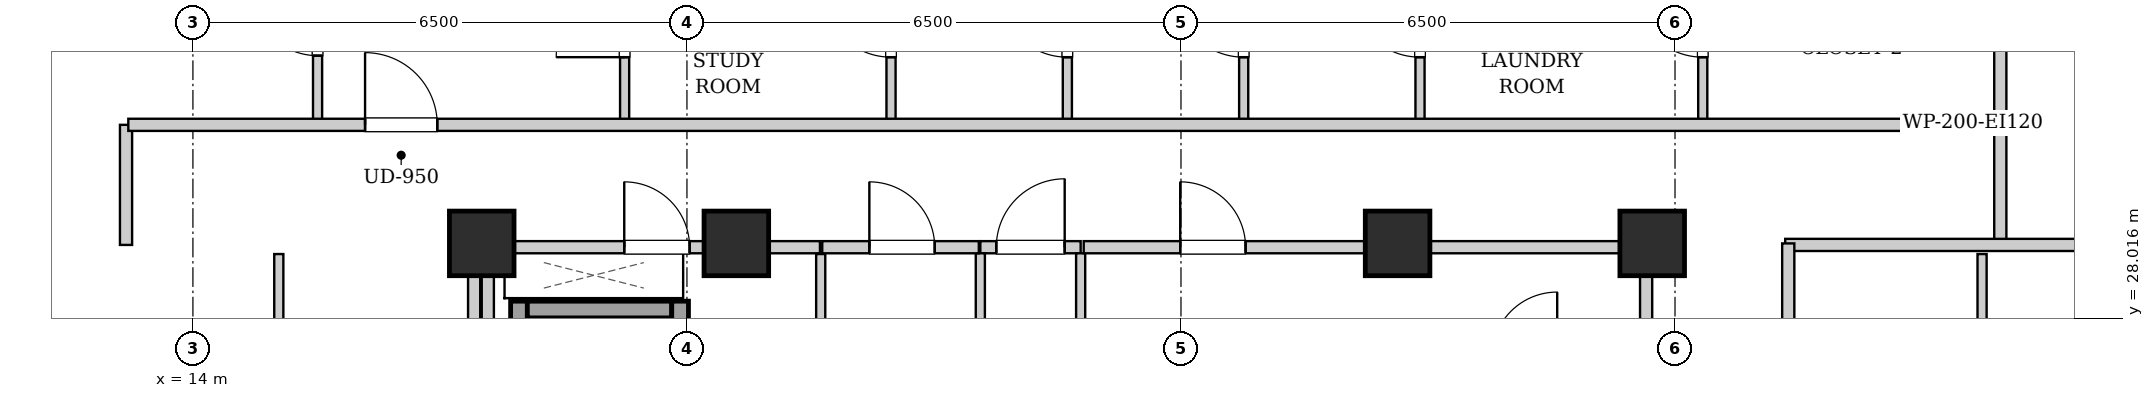
"""IFC4 building model, lengths in metres.
Left out: names, types, materials, properties, quantities, classifications, styles, units other than length and angle.
Written with IfcOpenShell. Run it as: python <this file> out.ifc"""

import sys

from ifc_helpers import new_model, si_unit, direction, frame, frame_2d, origin, origin_2d, place, context, subcontext, project, spatial, rectangle, extrude, element, fill, save


model = new_model("IFC4")
c1 = context("Model", 3, precision=1e-05, world=origin(), true_north=direction((0.0, 1.0)))
c2 = subcontext(c1, "Body", "Model", "MODEL_VIEW")
j1 = project(units=[si_unit("LENGTHUNIT", "METRE"), si_unit("PLANEANGLEUNIT", "RADIAN")], contexts=[c1])
p1 = place(None, origin())
s1 = spatial("IfcSite", under=j1, at=p1, CompositionType="ELEMENT")
p2 = place(p1, origin())
s2 = spatial("IfcBuilding", under=s1, at=p2, CompositionType="ELEMENT")
p3 = place(p2, frame((0.0, 0.0, 197.5)))
s3 = spatial("IfcBuildingStorey", under=s2, at=p3, CompositionType="ELEMENT", Elevation=197.5)
for number, where, z_axis, x_axis in (
    (1, (17.8, 29.0, 0.0), (0.0, 0.0, 1.0), (1.0, 0.0, 0.0)),
    (2, (21.15, 29.0, 0.0), (0.0, 0.0, 1.0), (1.0, 0.0, 0.0)),
    (3, (29.85, 29.0, 0.0), (0.0, 0.0, 1.0), (1.0, 0.0, 0.0)),
    (4, (33.2, 29.0, 0.0), (0.0, 0.0, 1.0), (1.0, 0.0, 0.0)),
):
    element("IfcColumn", number, at=place(p3, frame(where, z_axis=z_axis, x_axis=x_axis)), inside=s3, PredefinedType="COLUMN", context=c2, shape_type="SweptSolid", body=[
        extrude(rectangle(XDim=0.85, YDim=0.85, at=origin_2d()), origin(), (0.0, 0.0, 1.0), 3.3),
    ])
p4 = place(p3, frame((18.29, 24.1, 0.0), z_axis=(0.0, 0.0, 1.0), x_axis=(0.0, 1.0, 0.0)))
e5 = element("IfcWall", 5, at=p4, inside=s3, PredefinedType="SHEAR", context=c2, shape_type="SweptSolid", body=[
    extrude(rectangle(XDim=4.14, YDim=0.22, at=frame_2d((2.07, 0.0))), origin(), (0.0, 0.0, 1.0), 3.04),
])
p5 = place(p3, frame((18.4, 28.13, 0.0), z_axis=(0.0, 0.0, 1.0), x_axis=(1.0, 0.0, 0.0)))
e6 = element("IfcWall", 6, at=p5, inside=s3, PredefinedType="SHEAR", context=c2, shape_type="SweptSolid", body=[
    extrude(rectangle(XDim=1.9, YDim=0.22, at=frame_2d((0.95, 0.0))), origin(), (0.0, 0.0, 1.0), 3.04),
])
p6 = place(p3, frame((20.41, 26.06, 0.0), z_axis=(0.0, 0.0, 1.0), x_axis=(0.0, 1.0, 0.0)))
e7 = element("IfcWall", 7, at=p6, inside=s3, PredefinedType="SHEAR", context=c2, shape_type="SweptSolid", body=[
    extrude(rectangle(XDim=2.18, YDim=0.22, at=frame_2d((1.09, 0.0))), origin(), (0.0, 0.0, 1.0), 3.04),
])
p7 = place(p6, frame((0.54, 0.0, 0.0)))
e8 = element("IfcOpeningElement", 8, at=p7, cuts=e7, PredefinedType="OPENING", context=c2, shape_type="SweptSolid", body=[
    extrude(rectangle(XDim=1.1, YDim=2.15, at=frame_2d((0.55, 1.075))), frame((0.0, 0.12, 0.0), z_axis=(0.0, -1.0, 0.0), x_axis=(1.0, 0.0, 0.0)), (0.0, 0.0, 1.0), 0.24),
])
for number, where, z_axis, x_axis in (
    (9, (17.88, 24.12, 0.0), (0.0, 0.0, 1.0), (0.0, 1.0, 0.0)),
    (10, (33.12, 24.12, 0.0), (0.0, 0.0, 1.0), (0.0, 1.0, 0.0)),
):
    element("IfcWall", number, at=place(p3, frame(where, z_axis=z_axis, x_axis=x_axis)), inside=s3, PredefinedType="PARTITIONING", context=c2, shape_type="SweptSolid", body=[
        extrude(rectangle(XDim=4.76, YDim=0.16, at=frame_2d((2.38, 0.0))), origin(), (0.0, 0.0, 1.0), 2.375),
    ])
p8 = place(p3, frame((24.36, 28.95, 0.0), z_axis=(0.0, 0.0, 1.0), x_axis=(1.0, 0.0, 0.0)))
e11 = element("IfcWall", 11, at=p8, inside=s3, PredefinedType="PARTITIONING", context=c2, shape_type="SweptSolid", body=[
    extrude(rectangle(XDim=1.32, YDim=0.16, at=frame_2d((0.66, 0.0))), origin(), (0.0, 0.0, 1.0), 2.556),
])
p9 = place(p8, frame((0.21, 0.0, 0.0)))
e12 = element("IfcOpeningElement", 12, at=p9, cuts=e11, PredefinedType="OPENING", context=c2, shape_type="SweptSolid", body=[
    extrude(rectangle(XDim=0.9, YDim=2.05, at=frame_2d((0.45, 1.025))), frame((0.0, 0.09, 0.0), z_axis=(0.0, -1.0, 0.0), x_axis=(1.0, 0.0, 0.0)), (0.0, 0.0, 1.0), 0.18),
])
p10 = place(p3, frame((17.96, 28.95, 0.0), z_axis=(0.0, 0.0, 1.0), x_axis=(1.0, 0.0, 0.0)))
e13 = element("IfcWall", 13, at=p10, inside=s3, PredefinedType="PARTITIONING", context=c2, shape_type="SweptSolid", body=[
    extrude(rectangle(XDim=4.29, YDim=0.16, at=frame_2d((2.145, 0.0))), origin(), (0.0, 0.0, 1.0), 2.556),
])
p11 = place(p10, frame((1.715, 0.0, 0.0)))
e14 = element("IfcOpeningElement", 14, at=p11, cuts=e13, PredefinedType="OPENING", context=c2, shape_type="SweptSolid", body=[
    extrude(rectangle(XDim=0.86, YDim=2.05, at=frame_2d((0.43, 1.025))), frame((0.0, 0.09, 0.0), z_axis=(0.0, -1.0, 0.0), x_axis=(1.0, 0.0, 0.0)), (0.0, 0.0, 1.0), 0.18),
])
for number, where, z_axis, x_axis in (
    (15, (24.36, 25.0, 0.0), (0.0, 0.0, 1.0), (0.0, 1.0, 0.0)),
    (16, (25.68, 25.0, 0.0), (0.0, 0.0, 1.0), (0.0, 1.0, 0.0)),
):
    element("IfcWall", number, at=place(p3, frame(where, z_axis=z_axis, x_axis=x_axis)), inside=s3, PredefinedType="PARTITIONING", context=c2, shape_type="SweptSolid", body=[
        extrude(rectangle(XDim=3.87, YDim=0.12, at=frame_2d((1.935, 0.0))), origin(), (0.0, 0.0, 1.0), 3.04),
    ])
p12 = place(p3, frame((22.26, 25.0, 0.0), z_axis=(0.0, 0.0, 1.0), x_axis=(0.0, 1.0, 0.0)))
e17 = element("IfcWall", 17, at=p12, inside=s3, PredefinedType="PARTITIONING", context=c2, shape_type="SweptSolid", body=[
    extrude(rectangle(XDim=3.86, YDim=0.12, at=frame_2d((1.93, 0.0))), origin(), (0.0, 0.0, 1.0), 3.04),
])
p13 = place(p3, frame((22.28, 28.95, 0.0), z_axis=(0.0, 0.0, 1.0), x_axis=(1.0, 0.0, 0.0)))
e18 = element("IfcWall", 18, at=p13, inside=s3, PredefinedType="PARTITIONING", context=c2, shape_type="SweptSolid", body=[
    extrude(rectangle(XDim=2.06, YDim=0.16, at=frame_2d((1.03, 0.0))), origin(), (0.0, 0.0, 1.0), 2.556),
])
p14 = place(p13, frame((0.62, 0.0, 0.0)))
e19 = element("IfcOpeningElement", 19, at=p14, cuts=e18, PredefinedType="OPENING", context=c2, shape_type="SweptSolid", body=[
    extrude(rectangle(XDim=0.86, YDim=2.05, at=frame_2d((0.43, 1.025))), frame((0.0, 0.09, 0.0), z_axis=(0.0, -1.0, 0.0), x_axis=(1.0, 0.0, 0.0)), (0.0, 0.0, 1.0), 0.18),
])
p15 = place(p3, frame((25.72, 28.95, 0.0), z_axis=(0.0, 0.0, 1.0), x_axis=(1.0, 0.0, 0.0)))
e20 = element("IfcWall", 20, at=p15, inside=s3, PredefinedType="PARTITIONING", context=c2, shape_type="SweptSolid", body=[
    extrude(rectangle(XDim=7.32, YDim=0.16, at=frame_2d((3.66, 0.0))), origin(), (0.0, 0.0, 1.0), 2.556),
])
p16 = place(p15, frame((1.27, 0.0, 0.0)))
e21 = element("IfcOpeningElement", 21, at=p16, cuts=e20, PredefinedType="OPENING", context=c2, shape_type="SweptSolid", body=[
    extrude(rectangle(XDim=0.86, YDim=2.05, at=frame_2d((0.43, 1.025))), frame((0.0, 0.09, 0.0), z_axis=(0.0, -1.0, 0.0), x_axis=(1.0, 0.0, 0.0)), (0.0, 0.0, 1.0), 0.18),
])
for number, where, z_axis, x_axis in (
    (22, (13.12, 28.98, 0.0), (0.0, 0.0, 1.0), (0.0, 1.0, 0.0)),
    (23, (37.78, 28.98, 0.0), (0.0, 0.0, 1.0), (0.0, 1.0, 0.0)),
):
    element("IfcWall", number, at=place(p3, frame(where, z_axis=z_axis, x_axis=x_axis)), inside=s3, PredefinedType="PARTITIONING", context=c2, shape_type="SweptSolid", body=[
        extrude(rectangle(XDim=1.58, YDim=0.16, at=frame_2d((0.79, 0.0))), origin(), (0.0, 0.0, 1.0), 3.04),
    ])
p17 = place(p3, frame((34.95, 28.98, 0.0), z_axis=(0.0, 0.0, 1.0), x_axis=(1.0, 0.0, 0.0)))
e24 = element("IfcWall", 24, at=p17, inside=s3, PredefinedType="PARTITIONING", context=c2, shape_type="SweptSolid", body=[
    extrude(rectangle(XDim=5.07, YDim=0.16, at=frame_2d((2.535, 0.0))), origin(), (0.0, 0.0, 1.0), 2.556),
])
p18 = place(p3, frame((37.78, 30.6, 0.0), z_axis=(0.0, 0.0, 1.0), x_axis=(0.0, 1.0, 0.0)))
e25 = element("IfcWall", 25, at=p18, inside=s3, PredefinedType="PARTITIONING", context=c2, shape_type="SweptSolid", body=[
    extrude(rectangle(XDim=2.66, YDim=0.16, at=frame_2d((1.33, 0.0))), origin(), (0.0, 0.0, 1.0), 3.04),
])
p19 = place(p3, frame((15.64, 30.6, 0.0), z_axis=(0.0, 0.0, 1.0), x_axis=(0.0, 1.0, 0.0)))
e26 = element("IfcWall", 26, at=p19, inside=s3, PredefinedType="PARTITIONING", context=c2, shape_type="SweptSolid", body=[
    extrude(rectangle(XDim=2.6, YDim=0.12, at=frame_2d((1.3, 0.0))), origin(), (0.0, 0.0, 1.0), 3.04),
])
p20 = place(p19, frame((0.87, 0.0, 0.0)))
e27 = element("IfcOpeningElement", 27, at=p20, cuts=e26, PredefinedType="OPENING", context=c2, shape_type="SweptSolid", body=[
    extrude(rectangle(XDim=0.86, YDim=2.05, at=frame_2d((0.43, 1.025))), frame((0.0, 0.07, 0.0), z_axis=(0.0, -1.0, 0.0), x_axis=(1.0, 0.0, 0.0)), (0.0, 0.0, 1.0), 0.14),
])
p21 = place(p3, frame((19.68, 30.6, 0.0), z_axis=(0.0, 0.0, 1.0), x_axis=(0.0, 1.0, 0.0)))
e28 = element("IfcWall", 28, at=p21, inside=s3, PredefinedType="PARTITIONING", context=c2, shape_type="SweptSolid", body=[
    extrude(rectangle(XDim=2.6, YDim=0.12, at=frame_2d((1.3, 0.0))), origin(), (0.0, 0.0, 1.0), 3.04),
])
p22 = place(p21, frame((0.85, 0.0, 0.0)))
e29 = element("IfcOpeningElement", 29, at=p22, cuts=e28, PredefinedType="OPENING", context=c2, shape_type="SweptSolid", body=[
    extrude(rectangle(XDim=0.9, YDim=2.05, at=frame_2d((0.45, 1.025))), frame((0.0, 0.07, 0.0), z_axis=(0.0, -1.0, 0.0), x_axis=(1.0, 0.0, 0.0)), (0.0, 0.0, 1.0), 0.14),
])
p23 = place(p3, frame((23.185, 30.6, 0.0), z_axis=(0.0, 0.0, 1.0), x_axis=(0.0, 1.0, 0.0)))
e30 = element("IfcWall", 30, at=p23, inside=s3, PredefinedType="PARTITIONING", context=c2, shape_type="SweptSolid", body=[
    extrude(rectangle(XDim=2.6, YDim=0.12, at=frame_2d((1.3, 0.0))), origin(), (0.0, 0.0, 1.0), 3.04),
])
p24 = place(p23, frame((0.85, 0.0, 0.0)))
e31 = element("IfcOpeningElement", 31, at=p24, cuts=e30, PredefinedType="OPENING", context=c2, shape_type="SweptSolid", body=[
    extrude(rectangle(XDim=0.9, YDim=2.05, at=frame_2d((0.45, 1.025))), frame((0.0, 0.07, 0.0), z_axis=(0.0, -1.0, 0.0), x_axis=(1.0, 0.0, 0.0)), (0.0, 0.0, 1.0), 0.14),
])
p25 = place(p3, frame((25.505, 30.6, 0.0), z_axis=(0.0, 0.0, 1.0), x_axis=(0.0, 1.0, 0.0)))
e32 = element("IfcWall", 32, at=p25, inside=s3, PredefinedType="PARTITIONING", context=c2, shape_type="SweptSolid", body=[
    extrude(rectangle(XDim=2.6, YDim=0.12, at=frame_2d((1.3, 0.0))), origin(), (0.0, 0.0, 1.0), 3.04),
])
p26 = place(p25, frame((0.85, 0.0, 0.0)))
e33 = element("IfcOpeningElement", 33, at=p26, cuts=e32, PredefinedType="OPENING", context=c2, shape_type="SweptSolid", body=[
    extrude(rectangle(XDim=0.9, YDim=2.05, at=frame_2d((0.45, 1.025))), frame((0.0, 0.07, 0.0), z_axis=(0.0, -1.0, 0.0), x_axis=(1.0, 0.0, 0.0)), (0.0, 0.0, 1.0), 0.14),
])
p27 = place(p3, frame((27.825, 30.6, 0.0), z_axis=(0.0, 0.0, 1.0), x_axis=(0.0, 1.0, 0.0)))
e34 = element("IfcWall", 34, at=p27, inside=s3, PredefinedType="PARTITIONING", context=c2, shape_type="SweptSolid", body=[
    extrude(rectangle(XDim=2.6, YDim=0.12, at=frame_2d((1.3, 0.0))), origin(), (0.0, 0.0, 1.0), 3.04),
])
p28 = place(p27, frame((0.85, 0.0, 0.0)))
e35 = element("IfcOpeningElement", 35, at=p28, cuts=e34, PredefinedType="OPENING", context=c2, shape_type="SweptSolid", body=[
    extrude(rectangle(XDim=0.9, YDim=2.05, at=frame_2d((0.45, 1.025))), frame((0.0, 0.07, 0.0), z_axis=(0.0, -1.0, 0.0), x_axis=(1.0, 0.0, 0.0)), (0.0, 0.0, 1.0), 0.14),
])
p29 = place(p3, frame((30.145, 30.6, 0.0), z_axis=(0.0, 0.0, 1.0), x_axis=(0.0, 1.0, 0.0)))
e36 = element("IfcWall", 36, at=p29, inside=s3, PredefinedType="PARTITIONING", context=c2, shape_type="SweptSolid", body=[
    extrude(rectangle(XDim=2.6, YDim=0.12, at=frame_2d((1.3, 0.0))), origin(), (0.0, 0.0, 1.0), 3.04),
])
p30 = place(p29, frame((0.85, 0.0, 0.0)))
e37 = element("IfcOpeningElement", 37, at=p30, cuts=e36, PredefinedType="OPENING", context=c2, shape_type="SweptSolid", body=[
    extrude(rectangle(XDim=0.9, YDim=2.05, at=frame_2d((0.45, 1.025))), frame((0.0, 0.07, 0.0), z_axis=(0.0, -1.0, 0.0), x_axis=(1.0, 0.0, 0.0)), (0.0, 0.0, 1.0), 0.14),
])
p31 = place(p3, frame((33.865, 30.6, 0.0), z_axis=(0.0, 0.0, 1.0), x_axis=(0.0, 1.0, 0.0)))
e38 = element("IfcWall", 38, at=p31, inside=s3, PredefinedType="PARTITIONING", context=c2, shape_type="SweptSolid", body=[
    extrude(rectangle(XDim=2.6, YDim=0.12, at=frame_2d((1.3, 0.0))), origin(), (0.0, 0.0, 1.0), 3.04),
])
p32 = place(p31, frame((0.85, 0.0, 0.0)))
e39 = element("IfcOpeningElement", 39, at=p32, cuts=e38, PredefinedType="OPENING", context=c2, shape_type="SweptSolid", body=[
    extrude(rectangle(XDim=0.9, YDim=2.05, at=frame_2d((0.45, 1.025))), frame((0.0, 0.07, 0.0), z_axis=(0.0, -1.0, 0.0), x_axis=(1.0, 0.0, 0.0)), (0.0, 0.0, 1.0), 0.14),
])
p33 = place(p3, frame((15.13, 24.552, 0.0), z_axis=(0.0, 0.0, 1.0), x_axis=(0.0, 1.0, 0.0)))
e40 = element("IfcWall", 40, at=p33, inside=s3, PredefinedType="PARTITIONING", context=c2, shape_type="SweptSolid", body=[
    extrude(rectangle(XDim=4.308, YDim=0.12, at=frame_2d((2.154, 0.0))), origin(), (0.0, 0.0, 1.0), 3.04),
])
p34 = place(p33, frame((1.704, 0.0, 0.0)))
e41 = element("IfcOpeningElement", 41, at=p34, cuts=e40, PredefinedType="OPENING", context=c2, shape_type="SweptSolid", body=[
    extrude(rectangle(XDim=0.9, YDim=2.05, at=frame_2d((0.45, 1.025))), frame((0.0, 0.07, 0.0), z_axis=(0.0, -1.0, 0.0), x_axis=(1.0, 0.0, 0.0)), (0.0, 0.0, 1.0), 0.14),
])
p35 = place(p3, frame((37.54, 24.552, 0.0), z_axis=(0.0, 0.0, 1.0), x_axis=(0.0, 1.0, 0.0)))
e42 = element("IfcWall", 42, at=p35, inside=s3, PredefinedType="PARTITIONING", context=c2, shape_type="SweptSolid", body=[
    extrude(rectangle(XDim=4.308, YDim=0.12, at=frame_2d((2.154, 0.0))), origin(), (0.0, 0.0, 1.0), 3.04),
])
p36 = place(p35, frame((1.704, 0.0, 0.0)))
e43 = element("IfcOpeningElement", 43, at=p36, cuts=e42, PredefinedType="OPENING", context=c2, shape_type="SweptSolid", body=[
    extrude(rectangle(XDim=0.9, YDim=2.05, at=frame_2d((0.45, 1.025))), frame((0.0, 0.07, 0.0), z_axis=(0.0, -1.0, 0.0), x_axis=(1.0, 0.0, 0.0)), (0.0, 0.0, 1.0), 0.14),
])
p37 = place(p3, frame((13.15, 30.56, 0.0), z_axis=(0.0, 0.0, 1.0), x_axis=(1.0, 0.0, 0.0)))
e44 = element("IfcWall", 44, at=p37, inside=s3, PredefinedType="PARTITIONING", context=c2, shape_type="SweptSolid", body=[
    extrude(rectangle(XDim=24.6, YDim=0.16, at=frame_2d((12.3, 0.0))), origin(), (0.0, 0.0, 1.0), 3.04),
])
p38 = place(p37, frame((3.115, 0.0, 0.0)))
e45 = element("IfcOpeningElement", 45, at=p38, cuts=e44, PredefinedType="OPENING", context=c2, shape_type="SweptSolid", body=[
    extrude(rectangle(XDim=0.95, YDim=2.1, at=frame_2d((0.475, 1.05))), frame((0.0, 0.09, 0.0), z_axis=(0.0, -1.0, 0.0), x_axis=(1.0, 0.0, 0.0)), (0.0, 0.0, 1.0), 0.18),
])
p39 = place(p3, frame((17.7, 15.02, 0.0), z_axis=(0.0, 0.0, 1.0), x_axis=(0.0, 1.0, 0.0)))
e46 = element("IfcWall", 46, at=p39, inside=s3, PredefinedType="PARTITIONING", context=c2, shape_type="SweptSolid", body=[
    extrude(rectangle(XDim=13.98, YDim=0.16, at=frame_2d((6.99, 0.0))), origin(), (0.0, 0.0, 1.0), 2.375),
])
p40 = place(p3, frame((34.99, 15.07, 0.0), z_axis=(0.0, 0.0, 1.0), x_axis=(0.0, 1.0, 0.0)))
e47 = element("IfcWall", 47, at=p40, inside=s3, PredefinedType="PARTITIONING", context=c2, shape_type="SweptSolid", body=[
    extrude(rectangle(XDim=13.93, YDim=0.16, at=frame_2d((6.965, 0.0))), origin(), (0.0, 0.0, 1.0), 3.04),
])
p41 = place(p40, frame((4.385, 0.0, 0.0)))
e48 = element("IfcOpeningElement", 48, at=p41, cuts=e47, PredefinedType="OPENING", context=c2, shape_type="SweptSolid", body=[
    extrude(rectangle(XDim=0.95, YDim=2.1, at=frame_2d((0.475, 1.05))), frame((0.0, 0.09, 0.0), z_axis=(0.0, -1.0, 0.0), x_axis=(1.0, 0.0, 0.0)), (0.0, 0.0, 1.0), 0.18),
])
p42 = place(p9, origin())
e49 = element("IfcDoor", 49, at=p42, inside=s3, OperationType="SINGLE_SWING_RIGHT", PredefinedType="DOOR", context=c2, shape_type="SweptSolid", body=[
    extrude(rectangle(XDim=0.9, YDim=2.05, at=frame_2d((0.45, 1.025))), frame((0.0, 0.025, 0.0), z_axis=(0.0, -1.0, 0.0), x_axis=(1.0, 0.0, 0.0)), (0.0, 0.0, 1.0), 0.05),
])
fill(e12, e49)
p43 = place(p11, origin())
e50 = element("IfcDoor", 50, at=p43, inside=s3, OperationType="SINGLE_SWING_LEFT", PredefinedType="DOOR", context=c2, shape_type="SweptSolid", body=[
    extrude(rectangle(XDim=0.86, YDim=2.05, at=frame_2d((0.43, 1.025))), frame((0.0, 0.025, 0.0), z_axis=(0.0, -1.0, 0.0), x_axis=(1.0, 0.0, 0.0)), (0.0, 0.0, 1.0), 0.05),
])
fill(e14, e50)
p44 = place(p14, origin())
e51 = element("IfcDoor", 51, at=p44, inside=s3, OperationType="SINGLE_SWING_LEFT", PredefinedType="DOOR", context=c2, shape_type="SweptSolid", body=[
    extrude(rectangle(XDim=0.86, YDim=2.05, at=frame_2d((0.43, 1.025))), frame((0.0, 0.025, 0.0), z_axis=(0.0, -1.0, 0.0), x_axis=(1.0, 0.0, 0.0)), (0.0, 0.0, 1.0), 0.05),
])
fill(e19, e51)
p45 = place(p16, origin())
e52 = element("IfcDoor", 52, at=p45, inside=s3, OperationType="SINGLE_SWING_LEFT", PredefinedType="DOOR", context=c2, shape_type="SweptSolid", body=[
    extrude(rectangle(XDim=0.86, YDim=2.05, at=frame_2d((0.43, 1.025))), frame((0.0, 0.025, 0.0), z_axis=(0.0, -1.0, 0.0), x_axis=(1.0, 0.0, 0.0)), (0.0, 0.0, 1.0), 0.05),
])
fill(e21, e52)
p46 = place(p20, origin())
e53 = element("IfcDoor", 53, at=p46, inside=s3, OperationType="SINGLE_SWING_RIGHT", PredefinedType="DOOR", context=c2, shape_type="SweptSolid", body=[
    extrude(rectangle(XDim=0.86, YDim=2.05, at=frame_2d((0.43, 1.025))), frame((0.0, 0.025, 0.0), z_axis=(0.0, -1.0, 0.0), x_axis=(1.0, 0.0, 0.0)), (0.0, 0.0, 1.0), 0.05),
])
fill(e27, e53)
p47 = place(p22, origin())
e54 = element("IfcDoor", 54, at=p47, inside=s3, OperationType="SINGLE_SWING_LEFT", PredefinedType="DOOR", context=c2, shape_type="SweptSolid", body=[
    extrude(rectangle(XDim=0.9, YDim=2.05, at=frame_2d((0.45, 1.025))), frame((0.0, 0.025, 0.0), z_axis=(0.0, -1.0, 0.0), x_axis=(1.0, 0.0, 0.0)), (0.0, 0.0, 1.0), 0.05),
])
fill(e29, e54)
p48 = place(p24, origin())
e55 = element("IfcDoor", 55, at=p48, inside=s3, OperationType="SINGLE_SWING_RIGHT", PredefinedType="DOOR", context=c2, shape_type="SweptSolid", body=[
    extrude(rectangle(XDim=0.9, YDim=2.05, at=frame_2d((0.45, 1.025))), frame((0.0, 0.025, 0.0), z_axis=(0.0, -1.0, 0.0), x_axis=(1.0, 0.0, 0.0)), (0.0, 0.0, 1.0), 0.05),
])
fill(e31, e55)
p49 = place(p26, origin())
e56 = element("IfcDoor", 56, at=p49, inside=s3, OperationType="SINGLE_SWING_RIGHT", PredefinedType="DOOR", context=c2, shape_type="SweptSolid", body=[
    extrude(rectangle(XDim=0.9, YDim=2.05, at=frame_2d((0.45, 1.025))), frame((0.0, 0.025, 0.0), z_axis=(0.0, -1.0, 0.0), x_axis=(1.0, 0.0, 0.0)), (0.0, 0.0, 1.0), 0.05),
])
fill(e33, e56)
p50 = place(p28, origin())
e57 = element("IfcDoor", 57, at=p50, inside=s3, OperationType="SINGLE_SWING_RIGHT", PredefinedType="DOOR", context=c2, shape_type="SweptSolid", body=[
    extrude(rectangle(XDim=0.9, YDim=2.05, at=frame_2d((0.45, 1.025))), frame((0.0, 0.025, 0.0), z_axis=(0.0, -1.0, 0.0), x_axis=(1.0, 0.0, 0.0)), (0.0, 0.0, 1.0), 0.05),
])
fill(e35, e57)
p51 = place(p30, origin())
e58 = element("IfcDoor", 58, at=p51, inside=s3, OperationType="SINGLE_SWING_RIGHT", PredefinedType="DOOR", context=c2, shape_type="SweptSolid", body=[
    extrude(rectangle(XDim=0.9, YDim=2.05, at=frame_2d((0.45, 1.025))), frame((0.0, 0.025, 0.0), z_axis=(0.0, -1.0, 0.0), x_axis=(1.0, 0.0, 0.0)), (0.0, 0.0, 1.0), 0.05),
])
fill(e37, e58)
p52 = place(p32, origin())
e59 = element("IfcDoor", 59, at=p52, inside=s3, OperationType="SINGLE_SWING_RIGHT", PredefinedType="DOOR", context=c2, shape_type="SweptSolid", body=[
    extrude(rectangle(XDim=0.9, YDim=2.05, at=frame_2d((0.45, 1.025))), frame((0.0, 0.025, 0.0), z_axis=(0.0, -1.0, 0.0), x_axis=(1.0, 0.0, 0.0)), (0.0, 0.0, 1.0), 0.05),
])
fill(e39, e59)
p53 = place(p38, origin())
e60 = element("IfcDoor", 60, at=p53, inside=s3, OperationType="SINGLE_SWING_LEFT", PredefinedType="DOOR", context=c2, shape_type="SweptSolid", body=[
    extrude(rectangle(XDim=0.95, YDim=2.1, at=frame_2d((0.475, 1.05))), frame((0.0, 0.025, 0.0), z_axis=(0.0, -1.0, 0.0), x_axis=(1.0, 0.0, 0.0)), (0.0, 0.0, 1.0), 0.05),
])
fill(e45, e60)
save(model, sys.argv[1])
